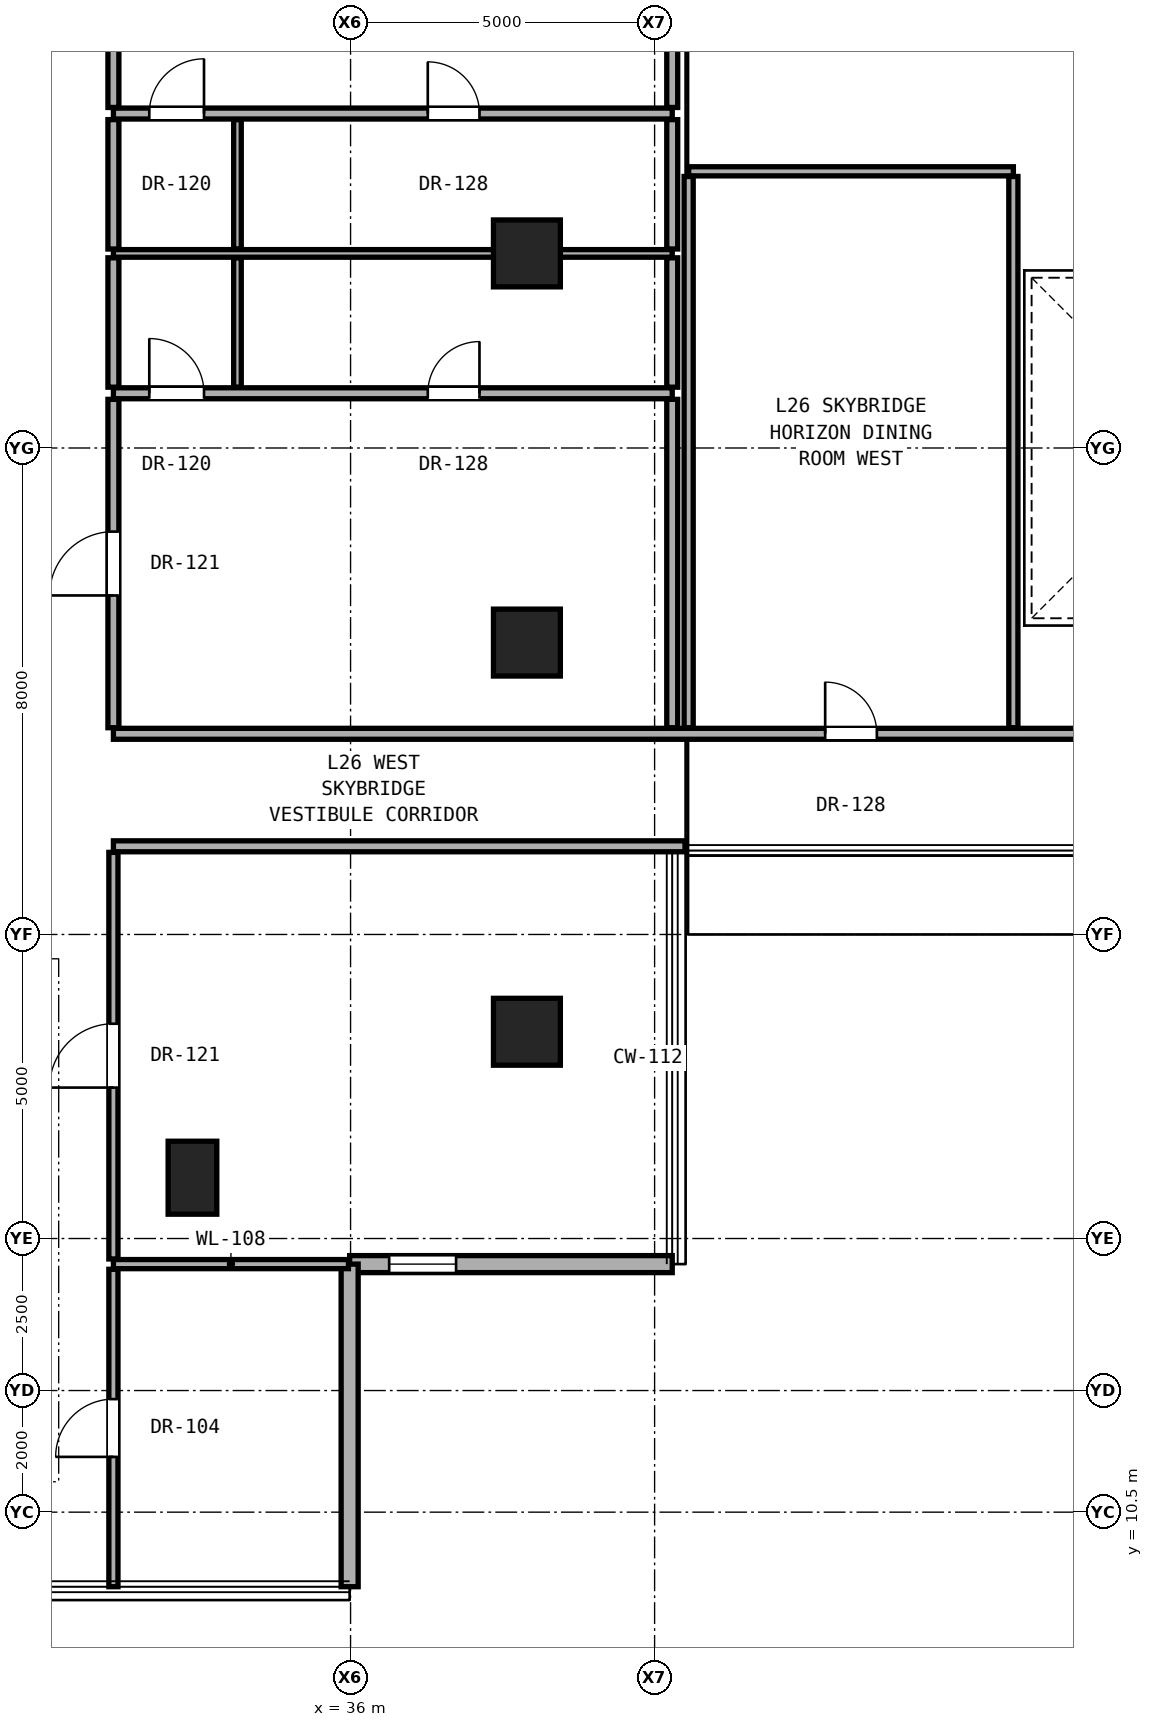
"""IFC4 building model, lengths in metres.
Left out: names, types, materials, properties, quantities, classifications, styles, units other than length and angle.
Written with IfcOpenShell. Run it as: python <this file> out.ifc"""

import sys

from ifc_helpers import new_model, si_unit, direction, frame, frame_2d, origin, origin_2d, place, context, subcontext, project, spatial, rectangle, hollow_rectangle, extrude, element, fill, save


model = new_model("IFC4")
c1 = context("Model", 3, precision=1e-05, world=origin(), true_north=direction((0.0, 1.0)))
c2 = subcontext(c1, "Body", "Model", "MODEL_VIEW")
j1 = project(units=[si_unit("LENGTHUNIT", "METRE"), si_unit("PLANEANGLEUNIT", "RADIAN")], contexts=[c1])
p1 = place(None, origin())
s1 = spatial("IfcSite", under=j1, at=p1, CompositionType="ELEMENT")
p2 = place(p1, origin())
s2 = spatial("IfcBuilding", under=s1, at=p2, CompositionType="ELEMENT")
p3 = place(p2, frame((0.0, 0.0, 95.0)))
s3 = spatial("IfcBuildingStorey", under=s2, at=p3, CompositionType="ELEMENT", Elevation=95.0)
for number, where, z_axis, x_axis in (
    (1, (38.9, 18.4, 0.0), (0.0, 0.0, 1.0), (1.0, 0.0, 0.0)),
    (2, (38.9, 24.8, 0.0), (0.0, 0.0, 1.0), (1.0, 0.0, 0.0)),
    (3, (38.9, 31.2, 0.0), (0.0, 0.0, 1.0), (1.0, 0.0, 0.0)),
):
    element("IfcColumn", number, at=place(p3, frame(where, z_axis=z_axis, x_axis=x_axis)), inside=s3, PredefinedType="COLUMN", context=c2, shape_type="SweptSolid", body=[
        extrude(hollow_rectangle(XDim=1.1, YDim=1.1, WallThickness=0.06, at=origin_2d()), origin(), (0.0, 0.0, 1.0), 3.3),
    ])
p4 = place(p3, frame((33.4, 16.0, 0.0), z_axis=(0.0, 0.0, 1.0), x_axis=(1.0, 0.0, 0.0)))
e4 = element("IfcColumn", 4, at=p4, inside=s3, PredefinedType="PILASTER", context=c2, shape_type="SweptSolid", body=[
    extrude(rectangle(XDim=0.8, YDim=1.2, at=origin_2d()), origin(), (0.0, 0.0, 1.0), 3.3),
])
p5 = place(p3, frame((35.985, 14.579, 0.0), z_axis=(0.0, 0.0, 1.0), x_axis=(1.0, 0.0, 0.0)))
e5 = element("IfcWall", 5, at=p5, inside=s3, PredefinedType="SOLIDWALL", context=c2, shape_type="SweptSolid", body=[
    extrude(rectangle(XDim=5.305, YDim=0.28, at=frame_2d((2.652, 0.0))), origin(), (0.0, 0.0, 1.0), 3.06),
])
p6 = place(p5, frame((0.65, 0.0, 0.85)))
e6 = element("IfcOpeningElement", 6, at=p6, cuts=e5, PredefinedType="OPENING", context=c2, shape_type="SweptSolid", body=[
    extrude(rectangle(XDim=1.1, YDim=2.0, at=frame_2d((0.55, 1.0))), frame((0.0, 0.15, 0.0), z_axis=(0.0, -1.0, 0.0), x_axis=(1.0, 0.0, 0.0)), (0.0, 0.0, 1.0), 0.3),
])
p7 = place(p3, frame((35.985, 9.274, 0.0), z_axis=(0.0, 0.0, 1.0), x_axis=(0.0, 1.0, 0.0)))
e7 = element("IfcWall", 7, at=p7, inside=s3, PredefinedType="SOLIDWALL", context=c2, shape_type="SweptSolid", body=[
    extrude(rectangle(XDim=5.305, YDim=0.28, at=frame_2d((2.653, 0.0))), origin(), (0.0, 0.0, 1.0), 3.06),
])
p8 = place(p3, frame((32.1, 14.579, 0.0), z_axis=(0.0, 0.0, 1.0), x_axis=(1.0, 0.0, 0.0)))
e8 = element("IfcWall", 8, at=p8, inside=s3, PredefinedType="PARTITIONING", context=c2, shape_type="SweptSolid", body=[
    extrude(rectangle(XDim=3.865, YDim=0.15, at=frame_2d((1.933, 0.0))), origin(), (0.0, 0.0, 1.0), 3.08),
])
p9 = place(p3, frame((32.1, 21.45, 0.0), z_axis=(0.0, 0.0, 1.0), x_axis=(1.0, 0.0, 0.0)))
e9 = element("IfcWall", 9, at=p9, inside=s3, PredefinedType="PARTITIONING", context=c2, shape_type="SweptSolid", body=[
    extrude(rectangle(XDim=9.4, YDim=0.18, at=frame_2d((4.7, 0.0))), origin(), (0.0, 0.0, 1.0), 2.105),
])
p10 = place(p3, frame((32.1, 23.3, 0.0), z_axis=(0.0, 0.0, 1.0), x_axis=(1.0, 0.0, 0.0)))
e10 = element("IfcWall", 10, at=p10, inside=s3, PredefinedType="PARTITIONING", context=c2, shape_type="SweptSolid", body=[
    extrude(rectangle(XDim=33.22, YDim=0.18, at=frame_2d((16.61, 0.0))), origin(), (0.0, 0.0, 1.0), 2.145),
])
p11 = place(p10, frame((11.705, 0.0, 0.0)))
e11 = element("IfcOpeningElement", 11, at=p11, cuts=e10, PredefinedType="OPENING", context=c2, shape_type="SweptSolid", body=[
    extrude(rectangle(XDim=0.85, YDim=2.01, at=frame_2d((0.425, 1.005))), frame((0.0, 0.1, 0.0), z_axis=(0.0, -1.0, 0.0), x_axis=(1.0, 0.0, 0.0)), (0.0, 0.0, 1.0), 0.2),
])
p12 = place(p10, frame((23.105, 0.0, 0.0)))
e12 = element("IfcOpeningElement", 12, at=p12, cuts=e10, PredefinedType="OPENING", context=c2, shape_type="SweptSolid", body=[
    extrude(rectangle(XDim=0.85, YDim=2.01, at=frame_2d((0.425, 1.005))), frame((0.0, 0.1, 0.0), z_axis=(0.0, -1.0, 0.0), x_axis=(1.0, 0.0, 0.0)), (0.0, 0.0, 1.0), 0.2),
])
p13 = place(p3, frame((32.1, 28.9, 0.0), z_axis=(0.0, 0.0, 1.0), x_axis=(1.0, 0.0, 0.0)))
e13 = element("IfcWall", 13, at=p13, inside=s3, PredefinedType="PARTITIONING", context=c2, shape_type="SweptSolid", body=[
    extrude(rectangle(XDim=9.19, YDim=0.18, at=frame_2d((4.595, 0.0))), origin(), (0.0, 0.0, 1.0), 2.145),
])
p14 = place(p13, frame((5.17, 0.0, 0.0)))
e14 = element("IfcOpeningElement", 14, at=p14, cuts=e13, PredefinedType="OPENING", context=c2, shape_type="SweptSolid", body=[
    extrude(rectangle(XDim=0.85, YDim=2.01, at=frame_2d((0.425, 1.005))), frame((0.0, 0.1, 0.0), z_axis=(0.0, -1.0, 0.0), x_axis=(1.0, 0.0, 0.0)), (0.0, 0.0, 1.0), 0.2),
])
p15 = place(p13, frame((0.59, 0.0, 0.0)))
e15 = element("IfcOpeningElement", 15, at=p15, cuts=e13, PredefinedType="OPENING", context=c2, shape_type="SweptSolid", body=[
    extrude(rectangle(XDim=0.9, YDim=2.1, at=frame_2d((0.45, 1.05))), frame((0.0, 0.1, 0.0), z_axis=(0.0, -1.0, 0.0), x_axis=(1.0, 0.0, 0.0)), (0.0, 0.0, 1.0), 0.2),
])
p16 = place(p3, frame((32.1, 31.2, 0.0), z_axis=(0.0, 0.0, 1.0), x_axis=(1.0, 0.0, 0.0)))
e16 = element("IfcWall", 16, at=p16, inside=s3, PredefinedType="PARTITIONING", context=c2, shape_type="SweptSolid", body=[
    extrude(rectangle(XDim=9.19, YDim=0.125, at=frame_2d((4.595, 0.0))), origin(), (0.0, 0.0, 1.0), 2.145),
])
p17 = place(p3, frame((41.56, 32.55, 0.0), z_axis=(0.0, 0.0, 1.0), x_axis=(1.0, 0.0, 0.0)))
e17 = element("IfcWall", 17, at=p17, inside=s3, PredefinedType="PARTITIONING", context=c2, shape_type="SweptSolid", body=[
    extrude(rectangle(XDim=5.34, YDim=0.15, at=frame_2d((2.67, 0.0))), origin(), (0.0, 0.0, 1.0), 2.416),
])
p18 = place(p3, frame((32.1, 33.5, 0.0), z_axis=(0.0, 0.0, 1.0), x_axis=(1.0, 0.0, 0.0)))
e18 = element("IfcWall", 18, at=p18, inside=s3, PredefinedType="PARTITIONING", context=c2, shape_type="SweptSolid", body=[
    extrude(rectangle(XDim=9.19, YDim=0.18, at=frame_2d((4.595, 0.0))), origin(), (0.0, 0.0, 1.0), 2.145),
])
p19 = place(p18, frame((5.17, 0.0, 0.0)))
e19 = element("IfcOpeningElement", 19, at=p19, cuts=e18, PredefinedType="OPENING", context=c2, shape_type="SweptSolid", body=[
    extrude(rectangle(XDim=0.85, YDim=2.01, at=frame_2d((0.425, 1.005))), frame((0.0, 0.1, 0.0), z_axis=(0.0, -1.0, 0.0), x_axis=(1.0, 0.0, 0.0)), (0.0, 0.0, 1.0), 0.2),
])
p20 = place(p18, frame((0.59, 0.0, 0.0)))
e20 = element("IfcOpeningElement", 20, at=p20, cuts=e18, PredefinedType="OPENING", context=c2, shape_type="SweptSolid", body=[
    extrude(rectangle(XDim=0.9, YDim=2.1, at=frame_2d((0.45, 1.05))), frame((0.0, 0.1, 0.0), z_axis=(0.0, -1.0, 0.0), x_axis=(1.0, 0.0, 0.0)), (0.0, 0.0, 1.0), 0.2),
])
p21 = place(p3, frame((32.1, 9.274, 0.0), z_axis=(0.0, 0.0, 1.0), x_axis=(0.0, 1.0, 0.0)))
e21 = element("IfcWall", 21, at=p21, inside=s3, PredefinedType="PARTITIONING", context=c2, shape_type="SweptSolid", body=[
    extrude(rectangle(XDim=5.22, YDim=0.15, at=frame_2d((2.61, 0.0))), origin(), (0.0, 0.0, 1.0), 3.08),
])
p22 = place(p21, frame((2.135, 0.0, 0.0)))
e22 = element("IfcOpeningElement", 22, at=p22, cuts=e21, PredefinedType="OPENING", context=c2, shape_type="SweptSolid", body=[
    extrude(rectangle(XDim=0.95, YDim=2.15, at=frame_2d((0.475, 1.075))), frame((0.0, 0.085, 0.0), z_axis=(0.0, -1.0, 0.0), x_axis=(1.0, 0.0, 0.0)), (0.0, 0.0, 1.0), 0.17),
])
p23 = place(p3, frame((32.1, 14.664, 0.0), z_axis=(0.0, 0.0, 1.0), x_axis=(0.0, 1.0, 0.0)))
e23 = element("IfcWall", 23, at=p23, inside=s3, PredefinedType="PARTITIONING", context=c2, shape_type="SweptSolid", body=[
    extrude(rectangle(XDim=6.686, YDim=0.15, at=frame_2d((3.343, 0.0))), origin(), (0.0, 0.0, 1.0), 2.456),
])
p24 = place(p23, frame((2.818, 0.0, 0.0)))
e24 = element("IfcOpeningElement", 24, at=p24, cuts=e23, PredefinedType="OPENING", context=c2, shape_type="SweptSolid", body=[
    extrude(rectangle(XDim=1.05, YDim=2.2, at=frame_2d((0.525, 1.1))), frame((0.0, 0.085, 0.0), z_axis=(0.0, -1.0, 0.0), x_axis=(1.0, 0.0, 0.0)), (0.0, 0.0, 1.0), 0.17),
])
p25 = place(p3, frame((32.1, 23.4, 0.0), z_axis=(0.0, 0.0, 1.0), x_axis=(0.0, 1.0, 0.0)))
e25 = element("IfcWall", 25, at=p25, inside=s3, PredefinedType="PARTITIONING", context=c2, shape_type="SweptSolid", body=[
    extrude(rectangle(XDim=5.4, YDim=0.18, at=frame_2d((2.7, 0.0))), origin(), (0.0, 0.0, 1.0), 2.299),
])
p26 = place(p25, frame((2.175, 0.0, 0.0)))
e26 = element("IfcOpeningElement", 26, at=p26, cuts=e25, PredefinedType="OPENING", context=c2, shape_type="SweptSolid", body=[
    extrude(rectangle(XDim=1.05, YDim=2.2, at=frame_2d((0.525, 1.1))), frame((0.0, 0.1, 0.0), z_axis=(0.0, -1.0, 0.0), x_axis=(1.0, 0.0, 0.0)), (0.0, 0.0, 1.0), 0.2),
])
for number, where, z_axis, x_axis in (
    (27, (32.1, 29.0, 0.0), (0.0, 0.0, 1.0), (0.0, 1.0, 0.0)),
    (28, (32.1, 31.272, 0.0), (0.0, 0.0, 1.0), (0.0, 1.0, 0.0)),
):
    element("IfcWall", number, at=place(p3, frame(where, z_axis=z_axis, x_axis=x_axis)), inside=s3, PredefinedType="PARTITIONING", context=c2, shape_type="SweptSolid", body=[
        extrude(rectangle(XDim=2.127, YDim=0.18, at=frame_2d((1.064, 0.0))), origin(), (0.0, 0.0, 1.0), 2.299),
    ])
p27 = place(p3, frame((32.1, 33.6, 0.0), z_axis=(0.0, 0.0, 1.0), x_axis=(0.0, 1.0, 0.0)))
e29 = element("IfcWall", 29, at=p27, inside=s3, PredefinedType="PARTITIONING", context=c2, shape_type="SweptSolid", body=[
    extrude(rectangle(XDim=7.721, YDim=0.18, at=frame_2d((3.86, 0.0))), origin(), (0.0, 0.0, 1.0), 2.456),
])
p28 = place(p27, frame((3.335, 0.0, 0.0)))
e30 = element("IfcOpeningElement", 30, at=p28, cuts=e29, PredefinedType="OPENING", context=c2, shape_type="SweptSolid", body=[
    extrude(rectangle(XDim=1.05, YDim=2.2, at=frame_2d((0.525, 1.1))), frame((0.0, 0.1, 0.0), z_axis=(0.0, -1.0, 0.0), x_axis=(1.0, 0.0, 0.0)), (0.0, 0.0, 1.0), 0.2),
])
for number, where, z_axis, x_axis in (
    (31, (34.14, 29.0, 0.0), (0.0, 0.0, 1.0), (0.0, 1.0, 0.0)),
    (32, (34.14, 31.272, 0.0), (0.0, 0.0, 1.0), (0.0, 1.0, 0.0)),
):
    element("IfcWall", number, at=place(p3, frame(where, z_axis=z_axis, x_axis=x_axis)), inside=s3, PredefinedType="PARTITIONING", context=c2, shape_type="SweptSolid", body=[
        extrude(rectangle(XDim=2.127, YDim=0.125, at=frame_2d((1.064, 0.0))), origin(), (0.0, 0.0, 1.0), 2.299),
    ])
p29 = place(p3, frame((41.29, 23.4, 0.0), z_axis=(0.0, 0.0, 1.0), x_axis=(0.0, 1.0, 0.0)))
e33 = element("IfcWall", 33, at=p29, inside=s3, PredefinedType="PARTITIONING", context=c2, shape_type="SweptSolid", body=[
    extrude(rectangle(XDim=5.4, YDim=0.18, at=frame_2d((2.7, 0.0))), origin(), (0.0, 0.0, 1.0), 2.105),
])
p30 = place(p3, frame((41.29, 29.0, 0.0), z_axis=(0.0, 0.0, 1.0), x_axis=(0.0, 1.0, 0.0)))
e34 = element("IfcWall", 34, at=p30, inside=s3, PredefinedType="PARTITIONING", context=c2, shape_type="SweptSolid", body=[
    extrude(rectangle(XDim=2.127, YDim=0.18, at=frame_2d((1.064, 0.0))), origin(), (0.0, 0.0, 1.0), 3.08),
])
p31 = place(p3, frame((41.29, 31.272, 0.0), z_axis=(0.0, 0.0, 1.0), x_axis=(0.0, 1.0, 0.0)))
e35 = element("IfcWall", 35, at=p31, inside=s3, PredefinedType="PARTITIONING", context=c2, shape_type="SweptSolid", body=[
    extrude(rectangle(XDim=2.127, YDim=0.18, at=frame_2d((1.064, 0.0))), origin(), (0.0, 0.0, 1.0), 2.105),
])
p32 = place(p3, frame((41.29, 33.6, 0.0), z_axis=(0.0, 0.0, 1.0), x_axis=(0.0, 1.0, 0.0)))
e36 = element("IfcWall", 36, at=p32, inside=s3, PredefinedType="PARTITIONING", context=c2, shape_type="SweptSolid", body=[
    extrude(rectangle(XDim=0.99, YDim=0.18, at=frame_2d((0.495, 0.0))), origin(), (0.0, 0.0, 1.0), 2.105),
])
for number, where, z_axis, x_axis in (
    (37, (41.56, 23.4, 0.0), (0.0, 0.0, 1.0), (0.0, 1.0, 0.0)),
    (38, (46.9, 23.4, 0.0), (0.0, 0.0, 1.0), (0.0, 1.0, 0.0)),
):
    element("IfcWall", number, at=place(p3, frame(where, z_axis=z_axis, x_axis=x_axis)), inside=s3, PredefinedType="PARTITIONING", context=c2, shape_type="SweptSolid", body=[
        extrude(rectangle(XDim=9.065, YDim=0.15, at=frame_2d((4.533, 0.0))), origin(), (0.0, 0.0, 1.0), 2.105),
    ])
p33 = place(p6, origin())
e39 = element("IfcWindow", 39, at=p33, inside=s3, PartitioningType="SINGLE_PANEL", PredefinedType="WINDOW", context=c2, shape_type="SweptSolid", body=[
    extrude(rectangle(XDim=1.1, YDim=2.0, at=frame_2d((0.55, 1.0))), frame((0.0, 0.03, 0.0), z_axis=(0.0, -1.0, 0.0), x_axis=(1.0, 0.0, 0.0)), (0.0, 0.0, 1.0), 0.06),
])
fill(e6, e39)
p34 = place(p26, origin())
e40 = element("IfcDoor", 40, at=p34, inside=s3, OperationType="SINGLE_SWING_LEFT", PredefinedType="DOOR", context=c2, shape_type="SweptSolid", body=[
    extrude(rectangle(XDim=1.05, YDim=2.2, at=frame_2d((0.525, 1.1))), frame((0.0, 0.025, 0.0), z_axis=(0.0, -1.0, 0.0), x_axis=(1.0, 0.0, 0.0)), (0.0, 0.0, 1.0), 0.05),
])
fill(e26, e40)
p35 = place(p14, origin())
e41 = element("IfcDoor", 41, at=p35, inside=s3, OperationType="SINGLE_SWING_RIGHT", PredefinedType="DOOR", context=c2, shape_type="SweptSolid", body=[
    extrude(rectangle(XDim=0.85, YDim=2.01, at=frame_2d((0.425, 1.005))), frame((0.0, 0.025, 0.0), z_axis=(0.0, -1.0, 0.0), x_axis=(1.0, 0.0, 0.0)), (0.0, 0.0, 1.0), 0.05),
])
fill(e14, e41)
p36 = place(p15, origin())
e42 = element("IfcDoor", 42, at=p36, inside=s3, OperationType="SINGLE_SWING_LEFT", PredefinedType="DOOR", context=c2, shape_type="SweptSolid", body=[
    extrude(rectangle(XDim=0.9, YDim=2.1, at=frame_2d((0.45, 1.05))), frame((0.0, 0.025, 0.0), z_axis=(0.0, -1.0, 0.0), x_axis=(1.0, 0.0, 0.0)), (0.0, 0.0, 1.0), 0.05),
])
fill(e15, e42)
p37 = place(p19, origin())
e43 = element("IfcDoor", 43, at=p37, inside=s3, OperationType="SINGLE_SWING_LEFT", PredefinedType="DOOR", context=c2, shape_type="SweptSolid", body=[
    extrude(rectangle(XDim=0.85, YDim=2.01, at=frame_2d((0.425, 1.005))), frame((0.0, 0.025, 0.0), z_axis=(0.0, -1.0, 0.0), x_axis=(1.0, 0.0, 0.0)), (0.0, 0.0, 1.0), 0.05),
])
fill(e19, e43)
p38 = place(p20, origin())
e44 = element("IfcDoor", 44, at=p38, inside=s3, OperationType="SINGLE_SWING_RIGHT", PredefinedType="DOOR", context=c2, shape_type="SweptSolid", body=[
    extrude(rectangle(XDim=0.9, YDim=2.1, at=frame_2d((0.45, 1.05))), frame((0.0, 0.025, 0.0), z_axis=(0.0, -1.0, 0.0), x_axis=(1.0, 0.0, 0.0)), (0.0, 0.0, 1.0), 0.05),
])
fill(e20, e44)
p39 = place(p22, origin())
e45 = element("IfcDoor", 45, at=p39, inside=s3, OperationType="SINGLE_SWING_LEFT", PredefinedType="DOOR", context=c2, shape_type="SweptSolid", body=[
    extrude(rectangle(XDim=0.95, YDim=2.15, at=frame_2d((0.475, 1.075))), frame((0.0, 0.025, 0.0), z_axis=(0.0, -1.0, 0.0), x_axis=(1.0, 0.0, 0.0)), (0.0, 0.0, 1.0), 0.05),
])
fill(e22, e45)
p40 = place(p24, origin())
e46 = element("IfcDoor", 46, at=p40, inside=s3, OperationType="SINGLE_SWING_LEFT", PredefinedType="DOOR", context=c2, shape_type="SweptSolid", body=[
    extrude(rectangle(XDim=1.05, YDim=2.2, at=frame_2d((0.525, 1.1))), frame((0.0, 0.025, 0.0), z_axis=(0.0, -1.0, 0.0), x_axis=(1.0, 0.0, 0.0)), (0.0, 0.0, 1.0), 0.05),
])
fill(e24, e46)
p41 = place(p11, origin())
e47 = element("IfcDoor", 47, at=p41, inside=s3, OperationType="SINGLE_SWING_LEFT", PredefinedType="DOOR", context=c2, shape_type="SweptSolid", body=[
    extrude(rectangle(XDim=0.85, YDim=2.01, at=frame_2d((0.425, 1.005))), frame((0.0, 0.025, 0.0), z_axis=(0.0, -1.0, 0.0), x_axis=(1.0, 0.0, 0.0)), (0.0, 0.0, 1.0), 0.05),
])
fill(e11, e47)
save(model, sys.argv[1])
